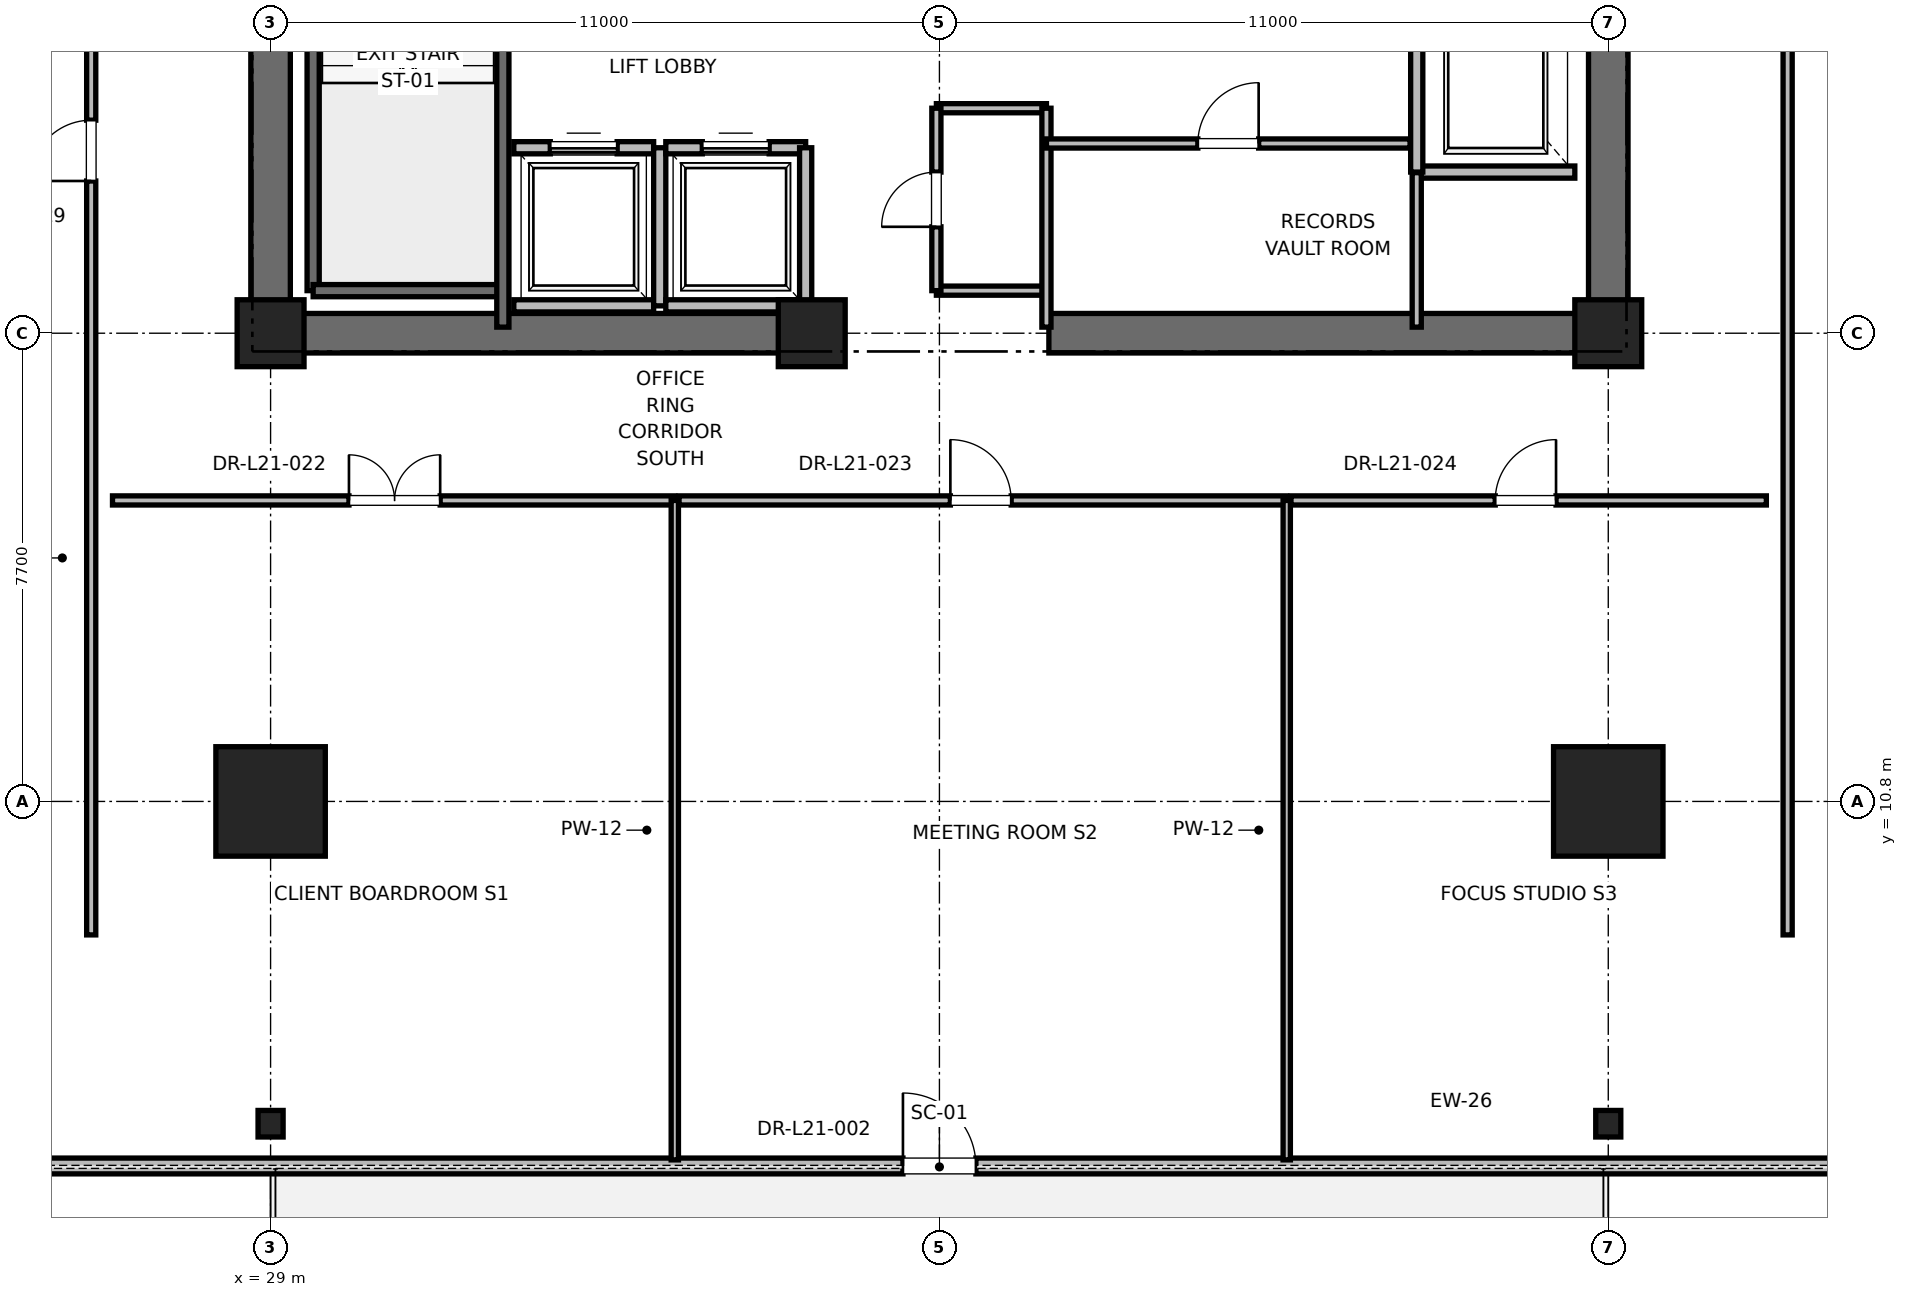
"""IFC4 building model, lengths in metres.
Left out: names, types, materials, properties, quantities, classifications, styles, units other than length and angle.
Written with IfcOpenShell. Run it as: python <this file> out.ifc"""

import sys

from ifc_helpers import new_model, si_unit, direction, frame, frame_2d, origin, origin_2d, place, context, subcontext, project, spatial, rectangle, i_section, extrude, element, fill, save


model = new_model("IFC4")
c1 = context("Model", 3, precision=1e-05, world=origin(), true_north=direction((0.0, 1.0)))
c2 = subcontext(c1, "Body", "Model", "MODEL_VIEW")
j1 = project(units=[si_unit("LENGTHUNIT", "METRE"), si_unit("PLANEANGLEUNIT", "RADIAN")], contexts=[c1])
p1 = place(None, origin())
s1 = spatial("IfcSite", under=j1, at=p1, CompositionType="ELEMENT")
p2 = place(p1, origin())
s2 = spatial("IfcBuilding", under=s1, at=p2, CompositionType="ELEMENT")
p3 = place(p2, frame((0.0, 0.0, 91.6)))
s3 = spatial("IfcBuildingStorey", under=s2, at=p3, CompositionType="ELEMENT", Elevation=91.6)
for number, where, z_axis, x_axis in (
    (1, (29.0, 10.8, 0.0), (0.0, 0.0, 1.0), (1.0, 0.0, 0.0)),
    (2, (51.0, 10.8, 0.0), (0.0, 0.0, 1.0), (1.0, 0.0, 0.0)),
):
    element("IfcColumn", number, at=place(p3, frame(where, z_axis=z_axis, x_axis=x_axis)), inside=s3, PredefinedType="COLUMN", context=c2, shape_type="SweptSolid", body=[
        extrude(rectangle(XDim=1.8, YDim=1.8, at=origin_2d()), origin(), (0.0, 0.0, 1.0), 4.0),
    ])
for number, where, z_axis, x_axis in (
    (3, (29.0, 5.5, 0.0), (0.0, 0.0, 1.0), (1.0, 0.0, 0.0)),
    (4, (51.0, 5.5, 0.0), (0.0, 0.0, 1.0), (1.0, 0.0, 0.0)),
):
    element("IfcColumn", number, at=place(p3, frame(where, z_axis=z_axis, x_axis=x_axis)), inside=s3, PredefinedType="COLUMN", context=c2, shape_type="SweptSolid", body=[
        extrude(i_section(OverallWidth=0.412, OverallDepth=0.437, WebThickness=0.036, FlangeThickness=0.058, FilletRadius=0.015, at=origin_2d()), origin(), (0.0, 0.0, 1.0), 4.0),
    ])
for number, where, z_axis, x_axis in (
    (5, (29.0, 18.5, 0.0), (0.0, 0.0, 1.0), (1.0, 0.0, 0.0)),
    (6, (51.0, 18.5, 0.0), (0.0, 0.0, 1.0), (1.0, 0.0, 0.0)),
    (7, (37.9, 18.5, 0.0), (0.0, 0.0, 1.0), (1.0, 0.0, 0.0)),
):
    element("IfcColumn", number, at=place(p3, frame(where, z_axis=z_axis, x_axis=x_axis)), inside=s3, PredefinedType="PILASTER", context=c2, shape_type="SweptSolid", body=[
        extrude(rectangle(XDim=1.1, YDim=1.1, at=origin_2d()), origin(), (0.0, 0.0, 1.0), 4.0),
    ])
for number, where, z_axis, x_axis in (
    (8, (29.0, 18.5, 0.0), (0.0, 0.0, 1.0), (1.0, 0.0, 0.0)),
    (9, (41.8, 18.5, 0.0), (0.0, 0.0, 1.0), (1.0, 0.0, 0.0)),
):
    element("IfcWall", number, at=place(p3, frame(where, z_axis=z_axis, x_axis=x_axis)), inside=s3, PredefinedType="SHEAR", context=c2, shape_type="SweptSolid", body=[
        extrude(rectangle(XDim=9.2, YDim=0.65, at=frame_2d((4.6, 0.0))), origin(), (0.0, 0.0, 1.0), 3.76),
    ])
p4 = place(p3, frame((29.0, 18.5, 0.0), z_axis=(0.0, 0.0, 1.0), x_axis=(0.0, 1.0, 0.0)))
e10 = element("IfcWall", 10, at=p4, inside=s3, PredefinedType="SHEAR", context=c2, shape_type="SweptSolid", body=[
    extrude(rectangle(XDim=8.8, YDim=0.65, at=frame_2d((4.4, 0.0))), origin(), (0.0, 0.0, 1.0), 3.76),
])
p5 = place(p3, frame((51.0, 18.5, 0.0), z_axis=(0.0, 0.0, 1.0), x_axis=(0.0, 1.0, 0.0)))
e11 = element("IfcWall", 11, at=p5, inside=s3, PredefinedType="SHEAR", context=c2, shape_type="SweptSolid", body=[
    extrude(rectangle(XDim=5.8, YDim=0.65, at=frame_2d((2.9, 0.0))), origin(), (0.0, 0.0, 1.0), 3.76),
])
p6 = place(p3, frame((17.436, 4.805, 0.0), z_axis=(0.0, 0.0, 1.0), x_axis=(1.0, 0.0, 0.0)))
e12 = element("IfcWall", 12, at=p6, inside=s3, PredefinedType="PARAPET", context=c2, shape_type="SweptSolid", body=[
    extrude(rectangle(XDim=45.128, YDim=0.26, at=frame_2d((22.564, 0.0))), origin(), (0.0, 0.0, 1.0), 3.273),
])
p7 = place(p6, frame((4.2, 0.0, 0.85)))
e13 = element("IfcOpeningElement", 13, at=p7, cuts=e12, PredefinedType="OPENING", context=c2, shape_type="SweptSolid", body=[
    extrude(rectangle(XDim=1.8, YDim=2.2, at=frame_2d((0.9, 1.1))), frame((0.0, 0.13, 0.0), z_axis=(0.0, -1.0, 0.0), x_axis=(1.0, 0.0, 0.0)), (0.0, 0.0, 1.0), 0.26),
])
p8 = place(p6, frame((21.964, 0.0, 0.0)))
e14 = element("IfcOpeningElement", 14, at=p8, cuts=e12, PredefinedType="OPENING", context=c2, shape_type="SweptSolid", body=[
    extrude(rectangle(XDim=1.2, YDim=2.2, at=frame_2d((0.6, 1.1))), frame((0.0, 0.13, 0.0), z_axis=(0.0, -1.0, 0.0), x_axis=(1.0, 0.0, 0.0)), (0.0, 0.0, 1.0), 0.26),
])
p9 = place(p6, frame((39.128, 0.0, 0.85)))
e15 = element("IfcOpeningElement", 15, at=p9, cuts=e12, PredefinedType="OPENING", context=c2, shape_type="SweptSolid", body=[
    extrude(rectangle(XDim=1.8, YDim=2.2, at=frame_2d((0.9, 1.1))), frame((0.0, 0.13, 0.0), z_axis=(0.0, -1.0, 0.0), x_axis=(1.0, 0.0, 0.0)), (0.0, 0.0, 1.0), 0.26),
])
p10 = place(p3, frame((29.7, 19.2, 0.0), z_axis=(0.0, 0.0, 1.0), x_axis=(0.0, 1.0, 0.0)))
e16 = element("IfcWall", 16, at=p10, inside=s3, PredefinedType="SOLIDWALL", context=c2, shape_type="SweptSolid", body=[
    extrude(rectangle(XDim=8.15, YDim=0.2, at=frame_2d((4.075, 0.0))), origin(), (0.0, 0.0, 1.0), 3.76),
])
p11 = place(p3, frame((29.7, 19.2, 0.0), z_axis=(0.0, 0.0, 1.0), x_axis=(1.0, 0.0, 0.0)))
e17 = element("IfcWall", 17, at=p11, inside=s3, PredefinedType="SOLIDWALL", context=c2, shape_type="SweptSolid", body=[
    extrude(rectangle(XDim=3.12, YDim=0.2, at=frame_2d((1.56, 0.0))), origin(), (0.0, 0.0, 1.0), 3.76),
])
p12 = place(p3, frame((32.82, 18.6, 0.0), z_axis=(0.0, 0.0, 1.0), x_axis=(0.0, 1.0, 0.0)))
e18 = element("IfcWall", 18, at=p12, inside=s3, PredefinedType="SOLIDWALL", context=c2, shape_type="SweptSolid", body=[
    extrude(rectangle(XDim=8.78, YDim=0.2, at=frame_2d((4.39, 0.0))), origin(), (0.0, 0.0, 1.0), 3.76),
])
p13 = place(p3, frame((47.85, 21.15, 0.0), z_axis=(0.0, 0.0, 1.0), x_axis=(1.0, 0.0, 0.0)))
e19 = element("IfcWall", 19, at=p13, inside=s3, PredefinedType="SOLIDWALL", context=c2, shape_type="SweptSolid", body=[
    extrude(rectangle(XDim=2.6, YDim=0.2, at=frame_2d((1.3, 0.0))), origin(), (0.0, 0.0, 1.0), 3.76),
])
p14 = place(p3, frame((47.85, 24.15, 0.0), z_axis=(0.0, 0.0, 1.0), x_axis=(0.0, -1.0, 0.0)))
e20 = element("IfcWall", 20, at=p14, inside=s3, PredefinedType="SOLIDWALL", context=c2, shape_type="SweptSolid", body=[
    extrude(rectangle(XDim=3.0, YDim=0.2, at=frame_2d((1.5, 0.0))), origin(), (0.0, 0.0, 1.0), 3.76),
])
p15 = place(p3, frame((33.0, 18.95, 0.0), z_axis=(0.0, 0.0, 1.0), x_axis=(1.0, 0.0, 0.0)))
e21 = element("IfcWall", 21, at=p15, inside=s3, PredefinedType="SOLIDWALL", context=c2, shape_type="SweptSolid", body=[
    extrude(rectangle(XDim=2.3, YDim=0.2, at=frame_2d((1.15, 0.0))), origin(), (0.0, 0.0, 1.0), 3.76),
])
p16 = place(p3, frame((35.3, 21.55, 0.0), z_axis=(0.0, 0.0, 1.0), x_axis=(-1.0, 0.0, 0.0)))
e22 = element("IfcWall", 22, at=p16, inside=s3, PredefinedType="SOLIDWALL", context=c2, shape_type="SweptSolid", body=[
    extrude(rectangle(XDim=2.3, YDim=0.2, at=frame_2d((1.15, 0.0))), origin(), (0.0, 0.0, 1.0), 3.76),
])
p17 = place(p16, frame((0.6, 0.0, 0.0)))
e23 = element("IfcOpeningElement", 23, at=p17, cuts=e22, PredefinedType="OPENING", context=c2, shape_type="SweptSolid", body=[
    extrude(rectangle(XDim=1.1, YDim=2.2, at=frame_2d((0.55, 1.1))), frame((0.0, 0.1, 0.0), z_axis=(0.0, -1.0, 0.0), x_axis=(1.0, 0.0, 0.0)), (0.0, 0.0, 1.0), 0.2),
])
p18 = place(p3, frame((35.4, 18.95, 0.0), z_axis=(0.0, 0.0, 1.0), x_axis=(0.0, 1.0, 0.0)))
e24 = element("IfcWall", 24, at=p18, inside=s3, PredefinedType="SOLIDWALL", context=c2, shape_type="SweptSolid", body=[
    extrude(rectangle(XDim=2.6, YDim=0.2, at=frame_2d((1.3, 0.0))), origin(), (0.0, 0.0, 1.0), 3.76),
])
p19 = place(p3, frame((35.5, 18.95, 0.0), z_axis=(0.0, 0.0, 1.0), x_axis=(1.0, 0.0, 0.0)))
e25 = element("IfcWall", 25, at=p19, inside=s3, PredefinedType="SOLIDWALL", context=c2, shape_type="SweptSolid", body=[
    extrude(rectangle(XDim=2.3, YDim=0.2, at=frame_2d((1.15, 0.0))), origin(), (0.0, 0.0, 1.0), 2.54),
])
p20 = place(p3, frame((37.8, 21.55, 0.0), z_axis=(0.0, 0.0, 1.0), x_axis=(-1.0, 0.0, 0.0)))
e26 = element("IfcWall", 26, at=p20, inside=s3, PredefinedType="SOLIDWALL", context=c2, shape_type="SweptSolid", body=[
    extrude(rectangle(XDim=2.3, YDim=0.2, at=frame_2d((1.15, 0.0))), origin(), (0.0, 0.0, 1.0), 3.76),
])
p21 = place(p20, frame((0.6, 0.0, 0.0)))
e27 = element("IfcOpeningElement", 27, at=p21, cuts=e26, PredefinedType="OPENING", context=c2, shape_type="SweptSolid", body=[
    extrude(rectangle(XDim=1.1, YDim=2.2, at=frame_2d((0.55, 1.1))), frame((0.0, 0.1, 0.0), z_axis=(0.0, -1.0, 0.0), x_axis=(1.0, 0.0, 0.0)), (0.0, 0.0, 1.0), 0.2),
])
p22 = place(p3, frame((37.8, 18.95, 0.0), z_axis=(0.0, 0.0, 1.0), x_axis=(0.0, 1.0, 0.0)))
e28 = element("IfcWall", 28, at=p22, inside=s3, PredefinedType="SOLIDWALL", context=c2, shape_type="SweptSolid", body=[
    extrude(rectangle(XDim=2.6, YDim=0.2, at=frame_2d((1.3, 0.0))), origin(), (0.0, 0.0, 1.0), 2.54),
])
for number, where, z_axis, x_axis in (
    (29, (39.95, 19.2, 0.0), (0.0, 0.0, 1.0), (1.0, 0.0, 0.0)),
    (30, (39.95, 22.2, 0.0), (0.0, 0.0, 1.0), (1.0, 0.0, 0.0)),
):
    element("IfcWall", number, at=place(p3, frame(where, z_axis=z_axis, x_axis=x_axis)), inside=s3, PredefinedType="PARTITIONING", context=c2, shape_type="SweptSolid", body=[
        extrude(rectangle(XDim=1.81, YDim=0.15, at=frame_2d((0.905, 0.0))), origin(), (0.0, 0.0, 1.0), 2.85),
    ])
p23 = place(p3, frame((41.76, 18.6, 0.0), z_axis=(0.0, 0.0, 1.0), x_axis=(0.0, 1.0, 0.0)))
e31 = element("IfcWall", 31, at=p23, inside=s3, PredefinedType="PARTITIONING", context=c2, shape_type="SweptSolid", body=[
    extrude(rectangle(XDim=3.6, YDim=0.15, at=frame_2d((1.8, 0.0))), origin(), (0.0, 0.0, 1.0), 2.54),
])
p24 = place(p3, frame((39.95, 19.2, 0.0), z_axis=(0.0, 0.0, 1.0), x_axis=(0.0, 1.0, 0.0)))
e32 = element("IfcWall", 32, at=p24, inside=s3, PredefinedType="PARTITIONING", context=c2, shape_type="SweptSolid", body=[
    extrude(rectangle(XDim=3.0, YDim=0.15, at=frame_2d((1.5, 0.0))), origin(), (0.0, 0.0, 1.0), 2.85),
])
p25 = place(p24, frame((1.05, 0.0, 0.0)))
e33 = element("IfcOpeningElement", 33, at=p25, cuts=e32, PredefinedType="OPENING", context=c2, shape_type="SweptSolid", body=[
    extrude(rectangle(XDim=0.9, YDim=2.1, at=frame_2d((0.45, 1.05))), frame((0.0, 0.075, 0.0), z_axis=(0.0, -1.0, 0.0), x_axis=(1.0, 0.0, 0.0)), (0.0, 0.0, 1.0), 0.15),
])
p26 = place(p3, frame((47.85, 18.6, 0.0), z_axis=(0.0, 0.0, 1.0), x_axis=(0.0, 1.0, 0.0)))
e34 = element("IfcWall", 34, at=p26, inside=s3, PredefinedType="PARTITIONING", context=c2, shape_type="SweptSolid", body=[
    extrude(rectangle(XDim=2.54, YDim=0.15, at=frame_2d((1.27, 0.0))), origin(), (0.0, 0.0, 1.0), 2.85),
])
p27 = place(p3, frame((41.76, 21.62, 0.0), z_axis=(0.0, 0.0, 1.0), x_axis=(1.0, 0.0, 0.0)))
e35 = element("IfcWall", 35, at=p27, inside=s3, PredefinedType="PARTITIONING", context=c2, shape_type="SweptSolid", body=[
    extrude(rectangle(XDim=5.98, YDim=0.15, at=frame_2d((2.99, 0.0))), origin(), (0.0, 0.0, 1.0), 2.85),
])
p28 = place(p27, frame((2.49, 0.0, 0.0)))
e36 = element("IfcOpeningElement", 36, at=p28, cuts=e35, PredefinedType="OPENING", context=c2, shape_type="SweptSolid", body=[
    extrude(rectangle(XDim=1.0, YDim=2.15, at=frame_2d((0.5, 1.075))), frame((0.0, 0.075, 0.0), z_axis=(0.0, -1.0, 0.0), x_axis=(1.0, 0.0, 0.0)), (0.0, 0.0, 1.0), 0.15),
])
p29 = place(p3, frame((26.4, 15.75, 0.0), z_axis=(0.0, 0.0, 1.0), x_axis=(1.0, 0.0, 0.0)))
e37 = element("IfcWall", 37, at=p29, inside=s3, PredefinedType="PARTITIONING", context=c2, shape_type="SweptSolid", body=[
    extrude(rectangle(XDim=9.248, YDim=0.15, at=frame_2d((4.624, 0.0))), origin(), (0.0, 0.0, 1.0), 2.85),
])
p30 = place(p29, frame((3.889, 0.0, 0.0)))
e38 = element("IfcOpeningElement", 38, at=p30, cuts=e37, PredefinedType="OPENING", context=c2, shape_type="SweptSolid", body=[
    extrude(rectangle(XDim=1.5, YDim=2.25, at=frame_2d((0.75, 1.125))), frame((0.0, 0.075, 0.0), z_axis=(0.0, -1.0, 0.0), x_axis=(1.0, 0.0, 0.0)), (0.0, 0.0, 1.0), 0.15),
])
p31 = place(p3, frame((35.648, 4.905, 0.0), z_axis=(0.0, 0.0, 1.0), x_axis=(0.0, 1.0, 0.0)))
e39 = element("IfcWall", 39, at=p31, inside=s3, PredefinedType="PARTITIONING", context=c2, shape_type="SweptSolid", body=[
    extrude(rectangle(XDim=10.845, YDim=0.12, at=frame_2d((5.422, 0.0))), origin(), (0.0, 0.0, 1.0), 2.39),
])
p32 = place(p3, frame((35.718, 15.75, 0.0), z_axis=(0.0, 0.0, 1.0), x_axis=(1.0, 0.0, 0.0)))
e40 = element("IfcWall", 40, at=p32, inside=s3, PredefinedType="PARTITIONING", context=c2, shape_type="SweptSolid", body=[
    extrude(rectangle(XDim=9.994, YDim=0.15, at=frame_2d((4.997, 0.0))), origin(), (0.0, 0.0, 1.0), 2.85),
])
p33 = place(p32, frame((4.462, 0.0, 0.0)))
e41 = element("IfcOpeningElement", 41, at=p33, cuts=e40, PredefinedType="OPENING", context=c2, shape_type="SweptSolid", body=[
    extrude(rectangle(XDim=1.0, YDim=2.15, at=frame_2d((0.5, 1.075))), frame((0.0, 0.075, 0.0), z_axis=(0.0, -1.0, 0.0), x_axis=(1.0, 0.0, 0.0)), (0.0, 0.0, 1.0), 0.15),
])
p34 = place(p3, frame((45.712, 4.905, 0.0), z_axis=(0.0, 0.0, 1.0), x_axis=(0.0, 1.0, 0.0)))
e42 = element("IfcWall", 42, at=p34, inside=s3, PredefinedType="PARTITIONING", context=c2, shape_type="SweptSolid", body=[
    extrude(rectangle(XDim=10.845, YDim=0.12, at=frame_2d((5.422, 0.0))), origin(), (0.0, 0.0, 1.0), 2.39),
])
p35 = place(p3, frame((45.782, 15.75, 0.0), z_axis=(0.0, 0.0, 1.0), x_axis=(1.0, 0.0, 0.0)))
e43 = element("IfcWall", 43, at=p35, inside=s3, PredefinedType="PARTITIONING", context=c2, shape_type="SweptSolid", body=[
    extrude(rectangle(XDim=7.818, YDim=0.15, at=frame_2d((3.909, 0.0))), origin(), (0.0, 0.0, 1.0), 2.85),
])
p36 = place(p35, frame((3.359, 0.0, 0.0)))
e44 = element("IfcOpeningElement", 44, at=p36, cuts=e43, PredefinedType="OPENING", context=c2, shape_type="SweptSolid", body=[
    extrude(rectangle(XDim=1.0, YDim=2.15, at=frame_2d((0.5, 1.075))), frame((0.0, 0.075, 0.0), z_axis=(0.0, -1.0, 0.0), x_axis=(1.0, 0.0, 0.0)), (0.0, 0.0, 1.0), 0.15),
])
p37 = place(p3, frame((26.05, 8.605, 0.0), z_axis=(0.0, 0.0, 1.0), x_axis=(0.0, 1.0, 0.0)))
e45 = element("IfcWall", 45, at=p37, inside=s3, PredefinedType="PARTITIONING", context=c2, shape_type="SweptSolid", body=[
    extrude(rectangle(XDim=15.872, YDim=0.15, at=frame_2d((7.936, 0.0))), origin(), (0.0, 0.0, 1.0), 2.85),
])
p38 = place(p37, frame((12.398, 0.0, 0.0)))
e46 = element("IfcOpeningElement", 46, at=p38, cuts=e45, PredefinedType="OPENING", context=c2, shape_type="SweptSolid", body=[
    extrude(rectangle(XDim=1.0, YDim=2.15, at=frame_2d((0.5, 1.075))), frame((0.0, 0.075, 0.0), z_axis=(0.0, -1.0, 0.0), x_axis=(1.0, 0.0, 0.0)), (0.0, 0.0, 1.0), 0.15),
])
p39 = place(p3, frame((53.95, 8.605, 0.0), z_axis=(0.0, 0.0, 1.0), x_axis=(0.0, 1.0, 0.0)))
e47 = element("IfcWall", 47, at=p39, inside=s3, PredefinedType="PARTITIONING", context=c2, shape_type="SweptSolid", body=[
    extrude(rectangle(XDim=21.918, YDim=0.15, at=frame_2d((10.959, 0.0))), origin(), (0.0, 0.0, 1.0), 2.85),
])
p40 = place(p39, frame((15.421, 0.0, 0.0)))
e48 = element("IfcOpeningElement", 48, at=p40, cuts=e47, PredefinedType="OPENING", context=c2, shape_type="SweptSolid", body=[
    extrude(rectangle(XDim=1.0, YDim=2.15, at=frame_2d((0.5, 1.075))), frame((0.0, 0.075, 0.0), z_axis=(0.0, -1.0, 0.0), x_axis=(1.0, 0.0, 0.0)), (0.0, 0.0, 1.0), 0.15),
])
p41 = place(p8, origin())
e49 = element("IfcDoor", 49, at=p41, inside=s3, OperationType="SINGLE_SWING_LEFT", PredefinedType="DOOR", context=c2, shape_type="SweptSolid", body=[
    extrude(rectangle(XDim=1.2, YDim=2.2, at=frame_2d((0.6, 1.1))), frame((0.0, 0.025, 0.0), z_axis=(0.0, -1.0, 0.0), x_axis=(1.0, 0.0, 0.0)), (0.0, 0.0, 1.0), 0.05),
])
fill(e14, e49)
p42 = place(p17, origin())
e50 = element("IfcDoor", 50, at=p42, inside=s3, OperationType="SLIDING_TO_RIGHT", PredefinedType="DOOR", context=c2, shape_type="SweptSolid", body=[
    extrude(rectangle(XDim=1.1, YDim=2.2, at=frame_2d((0.55, 1.1))), frame((0.0, 0.025, 0.0), z_axis=(0.0, -1.0, 0.0), x_axis=(1.0, 0.0, 0.0)), (0.0, 0.0, 1.0), 0.05),
])
fill(e23, e50)
p43 = place(p21, origin())
e51 = element("IfcDoor", 51, at=p43, inside=s3, OperationType="SLIDING_TO_RIGHT", PredefinedType="DOOR", context=c2, shape_type="SweptSolid", body=[
    extrude(rectangle(XDim=1.1, YDim=2.2, at=frame_2d((0.55, 1.1))), frame((0.0, 0.025, 0.0), z_axis=(0.0, -1.0, 0.0), x_axis=(1.0, 0.0, 0.0)), (0.0, 0.0, 1.0), 0.05),
])
fill(e27, e51)
p44 = place(p25, origin())
e52 = element("IfcDoor", 52, at=p44, inside=s3, OperationType="SINGLE_SWING_LEFT", PredefinedType="DOOR", context=c2, shape_type="SweptSolid", body=[
    extrude(rectangle(XDim=0.9, YDim=2.1, at=frame_2d((0.45, 1.05))), frame((0.0, 0.025, 0.0), z_axis=(0.0, -1.0, 0.0), x_axis=(1.0, 0.0, 0.0)), (0.0, 0.0, 1.0), 0.05),
])
fill(e33, e52)
p45 = place(p28, origin())
e53 = element("IfcDoor", 53, at=p45, inside=s3, OperationType="SINGLE_SWING_RIGHT", PredefinedType="DOOR", context=c2, shape_type="SweptSolid", body=[
    extrude(rectangle(XDim=1.0, YDim=2.15, at=frame_2d((0.5, 1.075))), frame((0.0, 0.025, 0.0), z_axis=(0.0, -1.0, 0.0), x_axis=(1.0, 0.0, 0.0)), (0.0, 0.0, 1.0), 0.05),
])
fill(e36, e53)
p46 = place(p30, origin())
e54 = element("IfcDoor", 54, at=p46, inside=s3, OperationType="DOUBLE_DOOR_SINGLE_SWING", PredefinedType="DOOR", context=c2, shape_type="SweptSolid", body=[
    extrude(rectangle(XDim=1.5, YDim=2.25, at=frame_2d((0.75, 1.125))), frame((0.0, 0.025, 0.0), z_axis=(0.0, -1.0, 0.0), x_axis=(1.0, 0.0, 0.0)), (0.0, 0.0, 1.0), 0.05),
])
fill(e38, e54)
p47 = place(p33, origin())
e55 = element("IfcDoor", 55, at=p47, inside=s3, OperationType="SINGLE_SWING_LEFT", PredefinedType="DOOR", context=c2, shape_type="SweptSolid", body=[
    extrude(rectangle(XDim=1.0, YDim=2.15, at=frame_2d((0.5, 1.075))), frame((0.0, 0.025, 0.0), z_axis=(0.0, -1.0, 0.0), x_axis=(1.0, 0.0, 0.0)), (0.0, 0.0, 1.0), 0.05),
])
fill(e41, e55)
p48 = place(p36, origin())
e56 = element("IfcDoor", 56, at=p48, inside=s3, OperationType="SINGLE_SWING_RIGHT", PredefinedType="DOOR", context=c2, shape_type="SweptSolid", body=[
    extrude(rectangle(XDim=1.0, YDim=2.15, at=frame_2d((0.5, 1.075))), frame((0.0, 0.025, 0.0), z_axis=(0.0, -1.0, 0.0), x_axis=(1.0, 0.0, 0.0)), (0.0, 0.0, 1.0), 0.05),
])
fill(e44, e56)
p49 = place(p38, origin())
e57 = element("IfcDoor", 57, at=p49, inside=s3, OperationType="SINGLE_SWING_LEFT", PredefinedType="DOOR", context=c2, shape_type="SweptSolid", body=[
    extrude(rectangle(XDim=1.0, YDim=2.15, at=frame_2d((0.5, 1.075))), frame((0.0, 0.025, 0.0), z_axis=(0.0, -1.0, 0.0), x_axis=(1.0, 0.0, 0.0)), (0.0, 0.0, 1.0), 0.05),
])
fill(e46, e57)
save(model, sys.argv[1])
